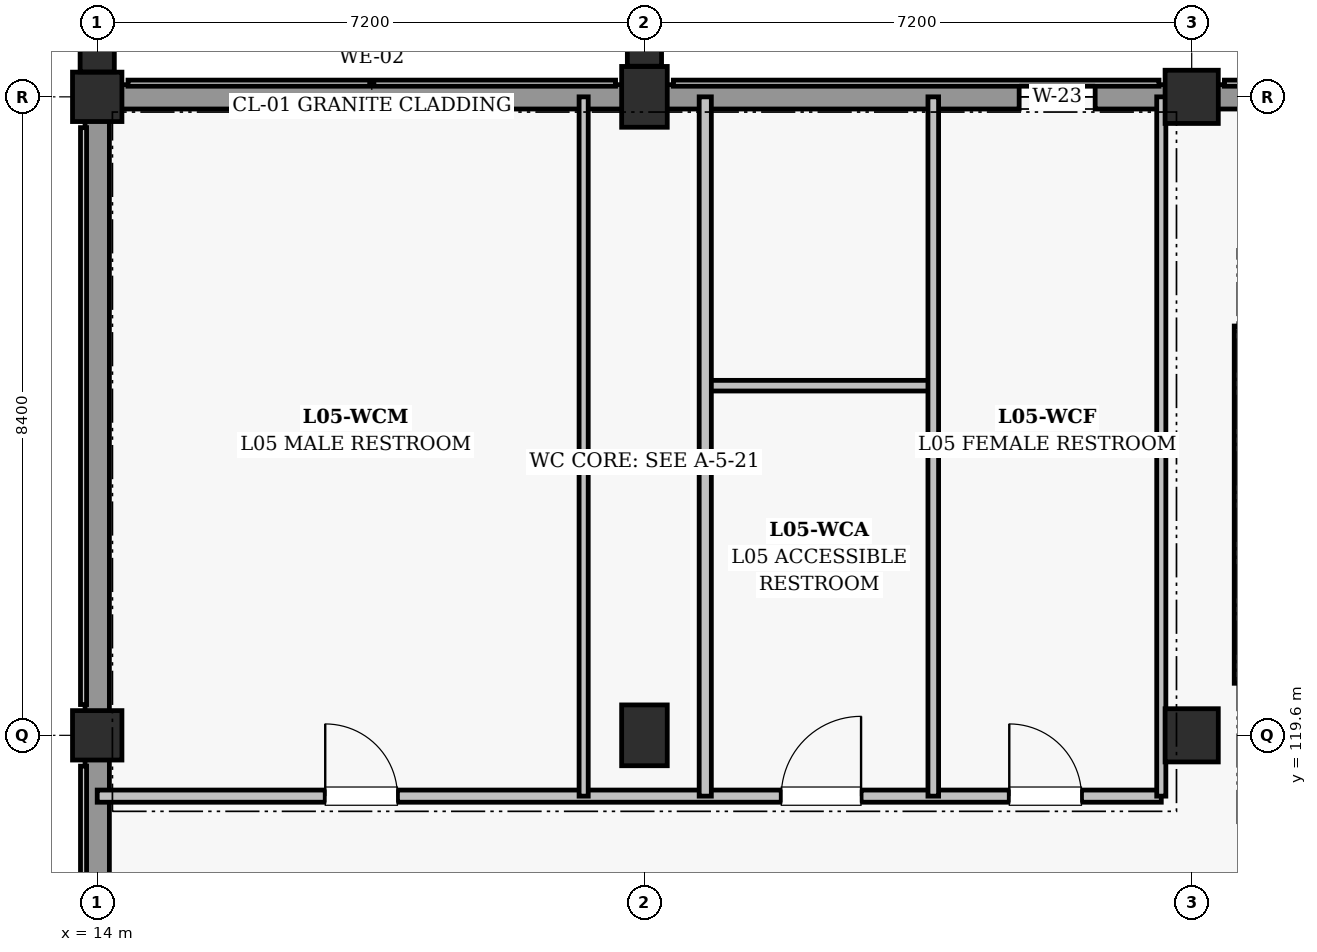
"""IFC4 building model, lengths in metres.
Left out: names, types, materials, properties, quantities, classifications, styles, units other than length and angle.
Written with IfcOpenShell. Run it as: python <this file> out.ifc"""

import sys

from ifc_helpers import new_model, si_unit, direction, frame, frame_2d, origin, origin_2d, place, context, subcontext, project, spatial, rectangle, extrude, element, fill, save


model = new_model("IFC4")
c1 = context("Model", 3, precision=1e-05, world=origin(), true_north=direction((0.0, 1.0)))
c2 = subcontext(c1, "Body", "Model", "MODEL_VIEW")
j1 = project(units=[si_unit("LENGTHUNIT", "METRE"), si_unit("PLANEANGLEUNIT", "RADIAN")], contexts=[c1])
p1 = place(None, origin())
s1 = spatial("IfcSite", under=j1, at=p1, CompositionType="ELEMENT")
p2 = place(p1, origin())
s2 = spatial("IfcBuilding", under=s1, at=p2, CompositionType="ELEMENT")
p3 = place(p2, frame((0.0, 0.0, 23.4)))
s3 = spatial("IfcBuildingStorey", under=s2, at=p3, CompositionType="ELEMENT", Elevation=23.4)
for number, where, z_axis, x_axis in (
    (1, (14.0, 119.6, 0.0), (0.0, 0.0, 1.0), (1.0, 0.0, 0.0)),
    (2, (14.0, 128.0, 0.0), (0.0, 0.0, 1.0), (1.0, 0.0, 0.0)),
):
    element("IfcColumn", number, at=place(p3, frame(where, z_axis=z_axis, x_axis=x_axis)), inside=s3, PredefinedType="COLUMN", context=c2, shape_type="SweptSolid", body=[
        extrude(rectangle(XDim=0.65, YDim=0.65, at=origin_2d()), origin(), (0.0, 0.0, 1.0), 4.5),
    ])
for number, where, z_axis, x_axis in (
    (3, (21.2, 119.6, 0.0), (0.0, 0.0, 1.0), (1.0, 0.0, 0.0)),
    (4, (21.2, 128.0, 0.0), (0.0, 0.0, 1.0), (1.0, 0.0, 0.0)),
):
    element("IfcColumn", number, at=place(p3, frame(where, z_axis=z_axis, x_axis=x_axis)), inside=s3, PredefinedType="COLUMN", context=c2, shape_type="SweptSolid", body=[
        extrude(rectangle(XDim=0.6, YDim=0.8, at=origin_2d()), origin(), (0.0, 0.0, 1.0), 4.5),
    ])
for number, where, z_axis, x_axis in (
    (5, (28.4, 119.6, 0.0), (0.0, 0.0, 1.0), (1.0, 0.0, 0.0)),
    (6, (28.4, 128.0, 0.0), (0.0, 0.0, 1.0), (1.0, 0.0, 0.0)),
):
    element("IfcColumn", number, at=place(p3, frame(where, z_axis=z_axis, x_axis=x_axis)), inside=s3, PredefinedType="COLUMN", context=c2, shape_type="SweptSolid", body=[
        extrude(rectangle(XDim=0.7, YDim=0.7, at=origin_2d()), origin(), (0.0, 0.0, 1.0), 4.5),
    ])
for number, where, z_axis, x_axis in (
    (7, (14.0, 128.653, 0.0), (0.0, 0.0, 1.0), (1.0, 0.0, 0.0)),
    (8, (21.2, 128.728, 0.0), (0.0, 0.0, 1.0), (1.0, 0.0, 0.0)),
):
    element("IfcColumn", number, at=place(p3, frame(where, z_axis=z_axis, x_axis=x_axis)), inside=s3, PredefinedType="PILASTER", context=c2, shape_type="SweptSolid", body=[
        extrude(rectangle(XDim=0.45, YDim=0.65, at=origin_2d()), origin(), (0.0, 0.0, 1.0), 4.5),
    ])
p4 = place(p3, frame((14.305, 128.0, 0.0), z_axis=(0.0, 0.0, 1.0), x_axis=(1.0, 0.0, 0.0)))
e9 = element("IfcWall", 9, at=p4, inside=s3, PredefinedType="SOLIDWALL", context=c2, shape_type="SweptSolid", body=[
    extrude(rectangle(XDim=6.615, YDim=0.32, at=frame_2d((3.308, 0.0))), origin(), (0.0, 0.0, 1.0), 3.305),
])
p5 = place(p3, frame((21.48, 128.0, 0.0), z_axis=(0.0, 0.0, 1.0), x_axis=(1.0, 0.0, 0.0)))
e10 = element("IfcWall", 10, at=p5, inside=s3, PredefinedType="SOLIDWALL", context=c2, shape_type="SweptSolid", body=[
    extrude(rectangle(XDim=6.59, YDim=0.32, at=frame_2d((3.295, 0.0))), origin(), (0.0, 0.0, 1.0), 3.305),
])
p6 = place(p5, frame((4.65, 0.0, 1.85)))
e11 = element("IfcOpeningElement", 11, at=p6, cuts=e10, PredefinedType="OPENING", context=c2, shape_type="SweptSolid", body=[
    extrude(rectangle(XDim=1.0, YDim=0.95, at=frame_2d((0.5, 0.475))), frame((0.0, 0.17, 0.0), z_axis=(0.0, -1.0, 0.0), x_axis=(1.0, 0.0, 0.0)), (0.0, 0.0, 1.0), 0.34),
])
p7 = place(p3, frame((28.73, 128.0, 0.0), z_axis=(0.0, 0.0, 1.0), x_axis=(1.0, 0.0, 0.0)))
e12 = element("IfcWall", 12, at=p7, inside=s3, PredefinedType="SOLIDWALL", context=c2, shape_type="SweptSolid", body=[
    extrude(rectangle(XDim=6.565, YDim=0.32, at=frame_2d((3.282, 0.0))), origin(), (0.0, 0.0, 1.0), 3.355),
])
p8 = place(p3, frame((14.0, 111.58, 0.0), z_axis=(0.0, 0.0, 1.0), x_axis=(0.0, 1.0, 0.0)))
e13 = element("IfcWall", 13, at=p8, inside=s3, PredefinedType="SOLIDWALL", context=c2, shape_type="SweptSolid", body=[
    extrude(rectangle(XDim=7.715, YDim=0.32, at=frame_2d((3.857, 0.0))), origin(), (0.0, 0.0, 1.0), 3.405),
])
p9 = place(p3, frame((14.0, 119.905, 0.0), z_axis=(0.0, 0.0, 1.0), x_axis=(0.0, 1.0, 0.0)))
e14 = element("IfcWall", 14, at=p9, inside=s3, PredefinedType="SOLIDWALL", context=c2, shape_type="SweptSolid", body=[
    extrude(rectangle(XDim=7.79, YDim=0.32, at=frame_2d((3.895, 0.0))), origin(), (0.0, 0.0, 1.0), 3.405),
])
p10 = place(p3, frame((29.085, 124.985, 0.0), z_axis=(0.0, 0.0, 1.0), x_axis=(0.0, -1.0, 0.0)))
e15 = element("IfcWall", 15, at=p10, inside=s3, PredefinedType="SHEAR", context=c2, shape_type="SweptSolid", body=[
    extrude(rectangle(XDim=4.7, YDim=0.25, at=frame_2d((2.35, 0.0))), origin(), (0.0, 0.0, 1.0), 4.175),
])
p11 = place(p3, frame((14.0, 118.8, 0.0), z_axis=(0.0, 0.0, 1.0), x_axis=(1.0, 0.0, 0.0)))
e16 = element("IfcWall", 16, at=p11, inside=s3, PredefinedType="PARTITIONING", context=c2, shape_type="SweptSolid", body=[
    extrude(rectangle(XDim=14.0, YDim=0.16, at=frame_2d((7.0, 0.0))), origin(), (0.0, 0.0, 1.0), 3.36),
])
p12 = place(p11, frame((3.0, 0.0, 0.0)))
e17 = element("IfcOpeningElement", 17, at=p12, cuts=e16, PredefinedType="OPENING", context=c2, shape_type="SweptSolid", body=[
    extrude(rectangle(XDim=0.95, YDim=2.15, at=frame_2d((0.475, 1.075))), frame((0.0, 0.09, 0.0), z_axis=(0.0, -1.0, 0.0), x_axis=(1.0, 0.0, 0.0)), (0.0, 0.0, 1.0), 0.18),
])
p13 = place(p11, frame((9.0, 0.0, 0.0)))
e18 = element("IfcOpeningElement", 18, at=p13, cuts=e16, PredefinedType="OPENING", context=c2, shape_type="SweptSolid", body=[
    extrude(rectangle(XDim=1.05, YDim=2.15, at=frame_2d((0.525, 1.075))), frame((0.0, 0.09, 0.0), z_axis=(0.0, -1.0, 0.0), x_axis=(1.0, 0.0, 0.0)), (0.0, 0.0, 1.0), 0.18),
])
p14 = place(p11, frame((12.0, 0.0, 0.0)))
e19 = element("IfcOpeningElement", 19, at=p14, cuts=e16, PredefinedType="OPENING", context=c2, shape_type="SweptSolid", body=[
    extrude(rectangle(XDim=0.95, YDim=2.15, at=frame_2d((0.475, 1.075))), frame((0.0, 0.09, 0.0), z_axis=(0.0, -1.0, 0.0), x_axis=(1.0, 0.0, 0.0)), (0.0, 0.0, 1.0), 0.18),
])
p15 = place(p3, frame((22.0, 124.2, 0.0), z_axis=(0.0, 0.0, 1.0), x_axis=(1.0, 0.0, 0.0)))
e20 = element("IfcWall", 20, at=p15, inside=s3, PredefinedType="PARTITIONING", context=c2, shape_type="SweptSolid", body=[
    extrude(rectangle(XDim=3.0, YDim=0.14, at=frame_2d((1.5, 0.0))), origin(), (0.0, 0.0, 1.0), 3.56),
])
p16 = place(p3, frame((20.4, 118.8, 0.0), z_axis=(0.0, 0.0, 1.0), x_axis=(0.0, 1.0, 0.0)))
e21 = element("IfcWall", 21, at=p16, inside=s3, PredefinedType="PARTITIONING", context=c2, shape_type="SweptSolid", body=[
    extrude(rectangle(XDim=9.2, YDim=0.12, at=frame_2d((4.6, 0.0))), origin(), (0.0, 0.0, 1.0), 3.41),
])
p17 = place(p3, frame((22.0, 118.8, 0.0), z_axis=(0.0, 0.0, 1.0), x_axis=(0.0, 1.0, 0.0)))
e22 = element("IfcWall", 22, at=p17, inside=s3, PredefinedType="PARTITIONING", context=c2, shape_type="SweptSolid", body=[
    extrude(rectangle(XDim=9.2, YDim=0.16, at=frame_2d((4.6, 0.0))), origin(), (0.0, 0.0, 1.0), 3.36),
])
p18 = place(p3, frame((25.0, 118.8, 0.0), z_axis=(0.0, 0.0, 1.0), x_axis=(0.0, 1.0, 0.0)))
e23 = element("IfcWall", 23, at=p18, inside=s3, PredefinedType="PARTITIONING", context=c2, shape_type="SweptSolid", body=[
    extrude(rectangle(XDim=9.2, YDim=0.14, at=frame_2d((4.6, 0.0))), origin(), (0.0, 0.0, 1.0), 3.36),
])
p19 = place(p3, frame((28.0, 118.8, 0.0), z_axis=(0.0, 0.0, 1.0), x_axis=(0.0, 1.0, 0.0)))
e24 = element("IfcWall", 24, at=p19, inside=s3, PredefinedType="PARTITIONING", context=c2, shape_type="SweptSolid", body=[
    extrude(rectangle(XDim=9.2, YDim=0.12, at=frame_2d((4.6, 0.0))), origin(), (0.0, 0.0, 1.0), 3.36),
])
p20 = place(p6, origin())
e25 = element("IfcWindow", 25, at=p20, inside=s3, PartitioningType="SINGLE_PANEL", PredefinedType="WINDOW", context=c2, shape_type="SweptSolid", body=[
    extrude(rectangle(XDim=1.0, YDim=0.95, at=frame_2d((0.5, 0.475))), frame((0.0, 0.03, 0.0), z_axis=(0.0, -1.0, 0.0), x_axis=(1.0, 0.0, 0.0)), (0.0, 0.0, 1.0), 0.06),
])
fill(e11, e25)
p21 = place(p12, origin())
e26 = element("IfcDoor", 26, at=p21, inside=s3, OperationType="SINGLE_SWING_LEFT", PredefinedType="DOOR", context=c2, shape_type="SweptSolid", body=[
    extrude(rectangle(XDim=0.95, YDim=2.15, at=frame_2d((0.475, 1.075))), frame((0.0, 0.025, 0.0), z_axis=(0.0, -1.0, 0.0), x_axis=(1.0, 0.0, 0.0)), (0.0, 0.0, 1.0), 0.05),
])
fill(e17, e26)
p22 = place(p13, origin())
e27 = element("IfcDoor", 27, at=p22, inside=s3, OperationType="SINGLE_SWING_RIGHT", PredefinedType="DOOR", context=c2, shape_type="SweptSolid", body=[
    extrude(rectangle(XDim=1.05, YDim=2.15, at=frame_2d((0.525, 1.075))), frame((0.0, 0.025, 0.0), z_axis=(0.0, -1.0, 0.0), x_axis=(1.0, 0.0, 0.0)), (0.0, 0.0, 1.0), 0.05),
])
fill(e18, e27)
p23 = place(p14, origin())
e28 = element("IfcDoor", 28, at=p23, inside=s3, OperationType="SINGLE_SWING_LEFT", PredefinedType="DOOR", context=c2, shape_type="SweptSolid", body=[
    extrude(rectangle(XDim=0.95, YDim=2.15, at=frame_2d((0.475, 1.075))), frame((0.0, 0.025, 0.0), z_axis=(0.0, -1.0, 0.0), x_axis=(1.0, 0.0, 0.0)), (0.0, 0.0, 1.0), 0.05),
])
fill(e19, e28)
save(model, sys.argv[1])
